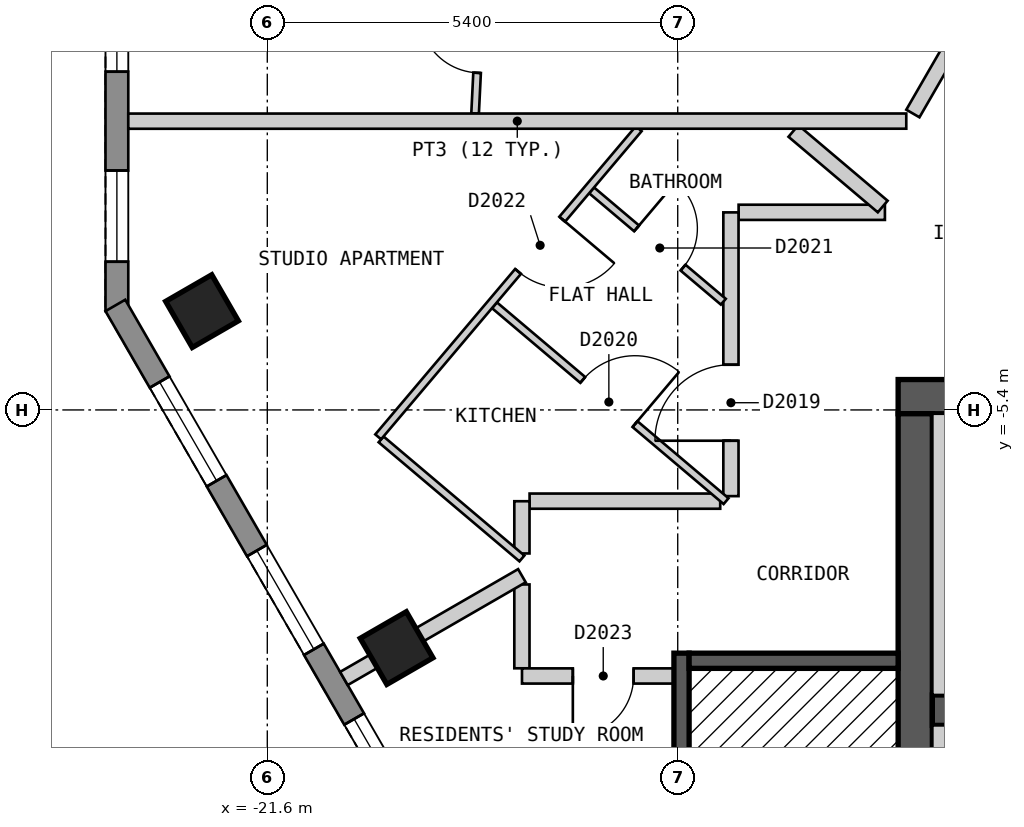
"""IFC4 building model, lengths in metres.
Left out: names, types, materials, properties, quantities, classifications, styles, units other than length and angle.
Written with IfcOpenShell. Run it as: python <this file> out.ifc"""

import sys

from ifc_helpers import new_model, si_unit, direction, frame, frame_2d, origin, origin_2d, place, context, subcontext, project, spatial, polyline, rectangle, outline, extrude, element, fill, save


model = new_model("IFC4")
c1 = context("Model", 3, precision=1e-05, world=origin(), true_north=direction((0.0, 1.0)))
c2 = subcontext(c1, "Body", "Model", "MODEL_VIEW")
j1 = project(units=[si_unit("LENGTHUNIT", "METRE"), si_unit("PLANEANGLEUNIT", "RADIAN")], contexts=[c1])
p1 = place(None, origin())
s1 = spatial("IfcSite", under=j1, at=p1, CompositionType="ELEMENT")
p2 = place(p1, origin())
s2 = spatial("IfcBuilding", under=s1, at=p2, CompositionType="ELEMENT")
p3 = place(p2, frame((0.0, 0.0, 238.8)))
s3 = spatial("IfcBuildingStorey", under=s2, at=p3, CompositionType="ELEMENT", Elevation=238.8)
for number, where, z_axis, x_axis in (
    (1, (-22.459, -4.1, 0.0), (0.0, 0.0, 1.0), (0.5, -0.866, 0.0)),
    (2, (-19.899, -8.533, 0.0), (0.0, 0.0, 1.0), (0.5, -0.866, 0.0)),
):
    element("IfcColumn", number, at=place(p3, frame(where, z_axis=z_axis, x_axis=x_axis)), inside=s3, PredefinedType="COLUMN", context=c2, shape_type="SweptSolid", body=[
        extrude(rectangle(XDim=0.7, YDim=0.7, at=origin_2d()), origin(), (0.0, 0.0, 1.0), 3.0),
    ])
p4 = place(p3, frame((-13.3, -5.225, 0.0), z_axis=(0.0, 0.0, 1.0), x_axis=(1.0, 0.0, 0.0)))
e3 = element("IfcWall", 3, at=p4, inside=s3, PredefinedType="SHEAR", context=c2, shape_type="SweptSolid", body=[
    extrude(rectangle(XDim=26.6, YDim=0.45, at=frame_2d((13.3, 0.0))), origin(), (0.0, 0.0, 1.0), 2.7),
])
p5 = place(p4, frame((23.65, 0.0, 0.0)))
e4 = element("IfcOpeningElement", 4, at=p5, cuts=e3, PredefinedType="OPENING", context=c2, shape_type="SweptSolid", body=[
    extrude(rectangle(XDim=1.2, YDim=2.1, at=frame_2d((0.6, 1.05))), frame((0.0, 0.235, 0.0), z_axis=(0.0, -1.0, 0.0), x_axis=(1.0, 0.0, 0.0)), (0.0, 0.0, 1.0), 0.47),
])
p6 = place(p3, frame((-13.075, -18.55, 0.0), z_axis=(0.0, 0.0, 1.0), x_axis=(0.0, 1.0, 0.0)))
e5 = element("IfcWall", 5, at=p6, inside=s3, PredefinedType="SHEAR", context=c2, shape_type="SweptSolid", body=[
    extrude(rectangle(XDim=13.1, YDim=0.45, at=frame_2d((6.55, 0.0))), origin(), (0.0, 0.0, 1.0), 2.7),
])
p7 = place(p6, frame((4.35, 0.0, 0.0)))
e6 = element("IfcOpeningElement", 6, at=p7, cuts=e5, PredefinedType="OPENING", context=c2, shape_type="SweptSolid", body=[
    extrude(rectangle(XDim=1.2, YDim=2.1, at=frame_2d((0.6, 1.05))), frame((0.0, 0.235, 0.0), z_axis=(0.0, -1.0, 0.0), x_axis=(1.0, 0.0, 0.0)), (0.0, 0.0, 1.0), 0.47),
])
p8 = place(p3, frame((-12.85, -9.35, 0.0), z_axis=(0.0, 0.0, 1.0), x_axis=(1.0, 0.0, 0.0)))
e7 = element("IfcWall", 7, at=p8, inside=s3, PredefinedType="SHEAR", context=c2, shape_type="SweptSolid", body=[
    extrude(rectangle(XDim=23.05, YDim=0.4, at=frame_2d((11.525, 0.0))), origin(), (0.0, 0.0, 1.0), 2.7),
])
p9 = place(p8, frame((1.45, 0.0, 0.0)))
e8 = element("IfcOpeningElement", 8, at=p9, cuts=e7, PredefinedType="OPENING", context=c2, shape_type="SweptSolid", body=[
    extrude(rectangle(XDim=1.1, YDim=2.1, at=frame_2d((0.55, 1.05))), frame((0.0, 0.21, 0.0), z_axis=(0.0, -1.0, 0.0), x_axis=(1.0, 0.0, 0.0)), (0.0, 0.0, 1.0), 0.42),
])
p10 = place(p8, frame((4.25, 0.0, 0.0)))
e9 = element("IfcOpeningElement", 9, at=p10, cuts=e7, PredefinedType="OPENING", context=c2, shape_type="SweptSolid", body=[
    extrude(rectangle(XDim=1.1, YDim=2.1, at=frame_2d((0.55, 1.05))), frame((0.0, 0.21, 0.0), z_axis=(0.0, -1.0, 0.0), x_axis=(1.0, 0.0, 0.0)), (0.0, 0.0, 1.0), 0.42),
])
p11 = place(p8, frame((7.05, 0.0, 0.0)))
e10 = element("IfcOpeningElement", 10, at=p11, cuts=e7, PredefinedType="OPENING", context=c2, shape_type="SweptSolid", body=[
    extrude(rectangle(XDim=1.1, YDim=2.1, at=frame_2d((0.55, 1.05))), frame((0.0, 0.21, 0.0), z_axis=(0.0, -1.0, 0.0), x_axis=(1.0, 0.0, 0.0)), (0.0, 0.0, 1.0), 0.42),
])
p12 = place(p8, frame((9.35, 0.0, 0.0)))
e11 = element("IfcOpeningElement", 11, at=p12, cuts=e7, PredefinedType="OPENING", context=c2, shape_type="SweptSolid", body=[
    extrude(rectangle(XDim=1.1, YDim=2.1, at=frame_2d((0.55, 1.05))), frame((0.0, 0.21, 0.0), z_axis=(0.0, -1.0, 0.0), x_axis=(1.0, 0.0, 0.0)), (0.0, 0.0, 1.0), 0.42),
])
p13 = place(p8, frame((11.65, 0.0, 0.0)))
e12 = element("IfcOpeningElement", 12, at=p13, cuts=e7, PredefinedType="OPENING", context=c2, shape_type="SweptSolid", body=[
    extrude(rectangle(XDim=1.1, YDim=2.1, at=frame_2d((0.55, 1.05))), frame((0.0, 0.21, 0.0), z_axis=(0.0, -1.0, 0.0), x_axis=(1.0, 0.0, 0.0)), (0.0, 0.0, 1.0), 0.42),
])
p14 = place(p8, frame((13.95, 0.0, 0.0)))
e13 = element("IfcOpeningElement", 13, at=p14, cuts=e7, PredefinedType="OPENING", context=c2, shape_type="SweptSolid", body=[
    extrude(rectangle(XDim=1.1, YDim=2.1, at=frame_2d((0.55, 1.05))), frame((0.0, 0.21, 0.0), z_axis=(0.0, -1.0, 0.0), x_axis=(1.0, 0.0, 0.0)), (0.0, 0.0, 1.0), 0.42),
])
p15 = place(p8, frame((16.25, 0.0, 0.0)))
e14 = element("IfcOpeningElement", 14, at=p15, cuts=e7, PredefinedType="OPENING", context=c2, shape_type="SweptSolid", body=[
    extrude(rectangle(XDim=1.1, YDim=2.1, at=frame_2d((0.55, 1.05))), frame((0.0, 0.21, 0.0), z_axis=(0.0, -1.0, 0.0), x_axis=(1.0, 0.0, 0.0)), (0.0, 0.0, 1.0), 0.42),
])
p16 = place(p8, frame((18.55, 0.0, 0.0)))
e15 = element("IfcOpeningElement", 15, at=p16, cuts=e7, PredefinedType="OPENING", context=c2, shape_type="SweptSolid", body=[
    extrude(rectangle(XDim=1.1, YDim=2.1, at=frame_2d((0.55, 1.05))), frame((0.0, 0.21, 0.0), z_axis=(0.0, -1.0, 0.0), x_axis=(1.0, 0.0, 0.0)), (0.0, 0.0, 1.0), 0.42),
])
p17 = place(p8, frame((20.95, 0.0, 0.0)))
e16 = element("IfcOpeningElement", 16, at=p17, cuts=e7, PredefinedType="OPENING", context=c2, shape_type="SweptSolid", body=[
    extrude(rectangle(XDim=1.1, YDim=2.1, at=frame_2d((0.55, 1.05))), frame((0.0, 0.21, 0.0), z_axis=(0.0, -1.0, 0.0), x_axis=(1.0, 0.0, 0.0)), (0.0, 0.0, 1.0), 0.42),
])
p18 = place(p3, frame((-23.579, 0.9, 0.0), z_axis=(0.0, 0.0, 1.0), x_axis=(0.0, -1.0, 0.0)))
e17 = element("IfcWall", 17, at=p18, inside=s3, PredefinedType="SOLIDWALL", context=c2, shape_type="SweptSolid", body=[
    extrude(outline(polyline([(0.0, -0.15), (5.0, -0.15), (4.92, 0.15), (0.08, 0.15), (0.0, -0.15)])), origin(), (0.0, 0.0, 1.0), 2.7),
])
p19 = place(p18, frame((0.65, 0.0, 0.15)))
e18 = element("IfcOpeningElement", 18, at=p19, cuts=e17, PredefinedType="OPENING", context=c2, shape_type="SweptSolid", body=[
    extrude(rectangle(XDim=1.2, YDim=2.1, at=frame_2d((0.6, 1.05))), frame((0.0, 0.16, 0.0), z_axis=(0.0, -1.0, 0.0), x_axis=(1.0, 0.0, 0.0)), (0.0, 0.0, 1.0), 0.32),
])
p20 = place(p18, frame((3.15, 0.0, 0.15)))
e19 = element("IfcOpeningElement", 19, at=p20, cuts=e17, PredefinedType="OPENING", context=c2, shape_type="SweptSolid", body=[
    extrude(rectangle(XDim=1.2, YDim=2.1, at=frame_2d((0.6, 1.05))), frame((0.0, 0.16, 0.0), z_axis=(0.0, -1.0, 0.0), x_axis=(1.0, 0.0, 0.0)), (0.0, 0.0, 1.0), 0.32),
])
p21 = place(p3, frame((-23.599, -4.025, 0.0), z_axis=(0.0, 0.0, 1.0), x_axis=(0.500012653391, -0.866018098222, 0.0)))
e20 = element("IfcWall", 20, at=p21, inside=s3, PredefinedType="SOLIDWALL", context=c2, shape_type="SweptSolid", body=[
    extrude(outline(polyline([(0.0, -0.15), (16.628, -0.15), (16.548, 0.15), (0.08, 0.15), (0.0, -0.15)])), origin(), (0.0, 0.0, 1.0), 2.7),
])
p22 = place(p21, frame((1.164, 0.0, 0.15)))
e21 = element("IfcOpeningElement", 21, at=p22, cuts=e20, PredefinedType="OPENING", context=c2, shape_type="SweptSolid", body=[
    extrude(rectangle(XDim=1.5, YDim=2.1, at=frame_2d((0.75, 1.05))), frame((0.0, 0.16, 0.0), z_axis=(0.0, -1.0, 0.0), x_axis=(1.0, 0.0, 0.0)), (0.0, 0.0, 1.0), 0.32),
])
p23 = place(p21, frame((3.724, 0.0, 0.15)))
e22 = element("IfcOpeningElement", 22, at=p23, cuts=e20, PredefinedType="OPENING", context=c2, shape_type="SweptSolid", body=[
    extrude(rectangle(XDim=1.5, YDim=2.1, at=frame_2d((0.75, 1.05))), frame((0.0, 0.16, 0.0), z_axis=(0.0, -1.0, 0.0), x_axis=(1.0, 0.0, 0.0)), (0.0, 0.0, 1.0), 0.32),
])
p24 = place(p21, frame((6.283, 0.0, 0.15)))
e23 = element("IfcOpeningElement", 23, at=p24, cuts=e20, PredefinedType="OPENING", context=c2, shape_type="SweptSolid", body=[
    extrude(rectangle(XDim=1.5, YDim=2.1, at=frame_2d((0.75, 1.05))), frame((0.0, 0.16, 0.0), z_axis=(0.0, -1.0, 0.0), x_axis=(1.0, 0.0, 0.0)), (0.0, 0.0, 1.0), 0.32),
])
p25 = place(p21, frame((8.843, 0.0, 0.15)))
e24 = element("IfcOpeningElement", 24, at=p25, cuts=e20, PredefinedType="OPENING", context=c2, shape_type="SweptSolid", body=[
    extrude(rectangle(XDim=1.5, YDim=2.1, at=frame_2d((0.75, 1.05))), frame((0.0, 0.16, 0.0), z_axis=(0.0, -1.0, 0.0), x_axis=(1.0, 0.0, 0.0)), (0.0, 0.0, 1.0), 0.32),
])
p26 = place(p21, frame((11.403, 0.0, 0.15)))
e25 = element("IfcOpeningElement", 25, at=p26, cuts=e20, PredefinedType="OPENING", context=c2, shape_type="SweptSolid", body=[
    extrude(rectangle(XDim=1.5, YDim=2.1, at=frame_2d((0.75, 1.05))), frame((0.0, 0.16, 0.0), z_axis=(0.0, -1.0, 0.0), x_axis=(1.0, 0.0, 0.0)), (0.0, 0.0, 1.0), 0.32),
])
p27 = place(p21, frame((13.962, 0.0, 0.15)))
e26 = element("IfcOpeningElement", 26, at=p27, cuts=e20, PredefinedType="OPENING", context=c2, shape_type="SweptSolid", body=[
    extrude(rectangle(XDim=1.5, YDim=2.1, at=frame_2d((0.75, 1.05))), frame((0.0, 0.16, 0.0), z_axis=(0.0, -1.0, 0.0), x_axis=(1.0, 0.0, 0.0)), (0.0, 0.0, 1.0), 0.32),
])
p28 = place(p3, frame((-18.25, -7.696, 0.0), z_axis=(0.0, 0.0, 1.0), x_axis=(0.0, -1.0, 0.0)))
e27 = element("IfcWall", 27, at=p28, inside=s3, PredefinedType="PARTITIONING", context=c2, shape_type="SweptSolid", body=[
    extrude(rectangle(XDim=1.103, YDim=0.2, at=frame_2d((0.552, 0.0))), origin(), (0.0, 0.0, 1.0), 2.7),
])
p29 = place(p3, frame((-18.149, -6.6, 0.0), z_axis=(0.0, 0.0, 1.0), x_axis=(1.0, 0.0, 0.0)))
e28 = element("IfcWall", 28, at=p29, inside=s3, PredefinedType="PARTITIONING", context=c2, shape_type="SweptSolid", body=[
    extrude(rectangle(XDim=2.508, YDim=0.2, at=frame_2d((1.254, 0.0))), origin(), (0.0, 0.0, 1.0), 2.7),
])
p30 = place(p3, frame((-18.249, -8.9, 0.0), z_axis=(0.0, 0.0, 1.0), x_axis=(1.0, 0.0, 0.0)))
e29 = element("IfcWall", 29, at=p30, inside=s3, PredefinedType="PARTITIONING", context=c2, shape_type="SweptSolid", body=[
    extrude(rectangle(XDim=2.199, YDim=0.2, at=frame_2d((1.1, 0.0))), origin(), (0.0, 0.0, 1.0), 2.7),
])
p31 = place(p30, frame((0.669, 0.0, 0.0)))
e30 = element("IfcOpeningElement", 30, at=p31, cuts=e29, PredefinedType="OPENING", context=c2, shape_type="SweptSolid", body=[
    extrude(rectangle(XDim=0.8, YDim=2.1, at=frame_2d((0.4, 1.05))), frame((0.0, 0.11, 0.0), z_axis=(0.0, -1.0, 0.0), x_axis=(1.0, 0.0, 0.0)), (0.0, 0.0, 1.0), 0.22),
])
p32 = place(p3, frame((-15.399, -2.8, 0.0), z_axis=(0.0, 0.0, 1.0), x_axis=(1.0, 0.0, 0.0)))
e31 = element("IfcWall", 31, at=p32, inside=s3, PredefinedType="PARTITIONING", context=c2, shape_type="SweptSolid", body=[
    extrude(rectangle(XDim=1.925, YDim=0.2, at=frame_2d((0.962, 0.0))), origin(), (0.0, 0.0, 1.0), 2.7),
])
p33 = place(p3, frame((-13.106, -1.5, 0.0), z_axis=(0.0, 0.0, 1.0), x_axis=(0.500025705601, 0.86601056214, 0.0)))
e32 = element("IfcWall", 32, at=p33, inside=s3, PredefinedType="PARTITIONING", context=c2, shape_type="SweptSolid", body=[
    extrude(rectangle(XDim=7.735, YDim=0.2, at=frame_2d((3.868, 0.0))), origin(), (0.0, 0.0, 1.0), 2.7),
])
p34 = place(p3, frame((-15.5, -6.534, 0.0), z_axis=(0.0, 0.0, 1.0), x_axis=(0.0, 1.0, 0.0)))
e33 = element("IfcWall", 33, at=p34, inside=s3, PredefinedType="PARTITIONING", context=c2, shape_type="SweptSolid", body=[
    extrude(rectangle(XDim=3.733, YDim=0.2, at=frame_2d((1.866, 0.0))), origin(), (0.0, 0.0, 1.0), 2.7),
])
p35 = place(p34, frame((0.729, 0.0, 0.0)))
e34 = element("IfcOpeningElement", 34, at=p35, cuts=e33, PredefinedType="OPENING", context=c2, shape_type="SweptSolid", body=[
    extrude(rectangle(XDim=1.0, YDim=2.1, at=frame_2d((0.5, 1.05))), frame((0.0, 0.11, 0.0), z_axis=(0.0, -1.0, 0.0), x_axis=(1.0, 0.0, 0.0)), (0.0, 0.0, 1.0), 0.22),
])
p36 = place(p3, frame((-18.25, -7.288, 0.0), z_axis=(0.0, 0.0, 1.0), x_axis=(0.0, 1.0, 0.0)))
e35 = element("IfcWall", 35, at=p36, inside=s3, PredefinedType="PARTITIONING", context=c2, shape_type="SweptSolid", body=[
    extrude(rectangle(XDim=0.687, YDim=0.2, at=frame_2d((0.344, 0.0))), origin(), (0.0, 0.0, 1.0), 2.7),
])
p37 = place(p3, frame((-17.333, -2.511, 0.0), z_axis=(0.0, 0.0, 1.0), x_axis=(0.763651478242, -0.645628701174, 0.0)))
e36 = element("IfcWall", 36, at=p37, inside=s3, PredefinedType="PARTITIONING", context=c2, shape_type="SweptSolid", body=[
    extrude(rectangle(XDim=2.269, YDim=0.1, at=frame_2d((1.135, 0.0))), origin(), (0.0, 0.0, 1.0), 2.7),
])
p38 = place(p37, frame((0.775, 0.0, 0.0)))
e37 = element("IfcOpeningElement", 37, at=p38, cuts=e36, PredefinedType="OPENING", context=c2, shape_type="SweptSolid", body=[
    extrude(rectangle(XDim=0.8, YDim=2.1, at=frame_2d((0.4, 1.05))), frame((0.0, 0.06, 0.0), z_axis=(0.0, -1.0, 0.0), x_axis=(1.0, 0.0, 0.0)), (0.0, 0.0, 1.0), 0.12),
])
p39 = place(p3, frame((-18.611, -4.023, 0.0), z_axis=(0.0, 0.0, 1.0), x_axis=(0.763532454368, -0.645769456639, 0.0)))
e38 = element("IfcWall", 38, at=p39, inside=s3, PredefinedType="PARTITIONING", context=c2, shape_type="SweptSolid", body=[
    extrude(rectangle(XDim=3.991, YDim=0.1, at=frame_2d((1.995, 0.0))), origin(), (0.0, 0.0, 1.0), 2.7),
])
p40 = place(p39, frame((1.521, 0.0, 0.0)))
e39 = element("IfcOpeningElement", 39, at=p40, cuts=e38, PredefinedType="OPENING", context=c2, shape_type="SweptSolid", body=[
    extrude(rectangle(XDim=0.9, YDim=2.1, at=frame_2d((0.45, 1.05))), frame((0.0, 0.06, 0.0), z_axis=(0.0, -1.0, 0.0), x_axis=(1.0, 0.0, 0.0)), (0.0, 0.0, 1.0), 0.12),
])
p41 = place(p3, frame((-20.103, -5.787, 0.0), z_axis=(0.0, 0.0, 1.0), x_axis=(0.763599944726, -0.645689650231, 0.0)))
e40 = element("IfcWall", 40, at=p41, inside=s3, PredefinedType="PARTITIONING", context=c2, shape_type="SweptSolid", body=[
    extrude(rectangle(XDim=2.427, YDim=0.1, at=frame_2d((1.213, 0.0))), origin(), (0.0, 0.0, 1.0), 2.7),
])
p42 = place(p3, frame((-20.141, -5.754, 0.0), z_axis=(0.0, 0.0, 1.0), x_axis=(0.645717522601, 0.763576375359, 0.0)))
e41 = element("IfcWall", 41, at=p42, inside=s3, PredefinedType="PARTITIONING", context=c2, shape_type="SweptSolid", body=[
    extrude(rectangle(XDim=5.309, YDim=0.1, at=frame_2d((2.655, 0.0))), origin(), (0.0, 0.0, 1.0), 2.7),
])
p43 = place(p42, frame((2.85, 0.0, 0.0)))
e42 = element("IfcOpeningElement", 42, at=p43, cuts=e41, PredefinedType="OPENING", context=c2, shape_type="SweptSolid", body=[
    extrude(rectangle(XDim=0.9, YDim=2.1, at=frame_2d((0.45, 1.05))), frame((0.0, 0.06, 0.0), z_axis=(0.0, -1.0, 0.0), x_axis=(1.0, 0.0, 0.0)), (0.0, 0.0, 1.0), 0.12),
])
p44 = place(p3, frame((-18.866, -1.5, 0.0), z_axis=(0.0, 0.0, 1.0), x_axis=(0.048923533446, 0.998802526967, 0.0)))
e43 = element("IfcWall", 43, at=p44, inside=s3, PredefinedType="PARTITIONING", context=c2, shape_type="SweptSolid", body=[
    extrude(rectangle(XDim=1.921, YDim=0.1, at=frame_2d((0.96, 0.0))), origin(), (0.0, 0.0, 1.0), 2.7),
])
p45 = place(p44, frame((0.536, 0.0, 0.0)))
e44 = element("IfcOpeningElement", 44, at=p45, cuts=e43, PredefinedType="OPENING", context=c2, shape_type="SweptSolid", body=[
    extrude(rectangle(XDim=0.8, YDim=2.1, at=frame_2d((0.4, 1.05))), frame((0.0, 0.06, 0.0), z_axis=(0.0, -1.0, 0.0), x_axis=(1.0, 0.0, 0.0)), (0.0, 0.0, 1.0), 0.12),
])
p46 = place(p3, frame((-14.678, -1.73, 0.0), z_axis=(0.0, 0.0, 1.0), x_axis=(0.763428399558, -0.645892466861, 0.0)))
e45 = element("IfcWall", 45, at=p46, inside=s3, PredefinedType="PARTITIONING", context=c2, shape_type="SweptSolid", body=[
    extrude(rectangle(XDim=1.539, YDim=0.2, at=frame_2d((0.77, 0.0))), origin(), (0.0, 0.0, 1.0), 2.7),
])
p47 = place(p3, frame((-23.429, -1.601, 0.0), z_axis=(0.0, 0.0, 1.0), x_axis=(0.999999995449, 9.5406191e-05, 0.0)))
e46 = element("IfcWall", 46, at=p47, inside=s3, PredefinedType="PARTITIONING", context=c2, shape_type="SweptSolid", body=[
    extrude(rectangle(XDim=10.236, YDim=0.2, at=frame_2d((5.118, 0.0))), origin(), (0.0, 0.0, 1.0), 2.7),
])
p48 = place(p3, frame((-20.592, -8.933, 0.0), z_axis=(0.0, 0.0, 1.0), x_axis=(0.866045775131, 0.499964714133, 0.0)))
e47 = element("IfcWall", 47, at=p48, inside=s3, PredefinedType="PARTITIONING", context=c2, shape_type="SweptSolid", body=[
    extrude(rectangle(XDim=2.704, YDim=0.2, at=frame_2d((1.352, 0.0))), origin(), (0.0, 0.0, 1.0), 2.7),
])
p49 = place(p3, frame((-16.15, -14.4, 0.0), z_axis=(0.0, 0.0, 1.0), x_axis=(0.0, 1.0, 0.0)))
e48 = element("IfcWall", 48, at=p49, inside=s3, PredefinedType="SOLIDWALL", context=c2, shape_type="SweptSolid", body=[
    extrude(rectangle(XDim=5.8, YDim=0.2, at=frame_2d((2.9, 0.0))), origin(), (0.0, 0.0, 1.0), 2.7),
])
p50 = place(p3, frame((-16.05, -8.7, 0.0), z_axis=(0.0, 0.0, 1.0), x_axis=(1.0, 0.0, 0.0)))
e49 = element("IfcWall", 49, at=p50, inside=s3, PredefinedType="SOLIDWALL", context=c2, shape_type="SweptSolid", body=[
    extrude(rectangle(XDim=2.75, YDim=0.2, at=frame_2d((1.375, 0.0))), origin(), (0.0, 0.0, 1.0), 2.7),
])
p51 = place(p3, frame((-12.475, -13.0, 0.0), z_axis=(0.0, 0.0, 1.0), x_axis=(0.0, 1.0, 0.0)))
e50 = element("IfcWall", 50, at=p51, inside=s3, PredefinedType="PARTITIONING", context=c2, shape_type="SweptSolid", body=[
    extrude(rectangle(XDim=3.45, YDim=0.75, at=frame_2d((1.725, 0.0))), origin(), (0.0, 0.0, 1.0), 2.7),
])
p52 = place(p3, frame((-12.475, -9.15, 0.0), z_axis=(0.0, 0.0, 1.0), x_axis=(0.0, 1.0, 0.0)))
e51 = element("IfcWall", 51, at=p52, inside=s3, PredefinedType="SOLIDWALL", context=c2, shape_type="SweptSolid", body=[
    extrude(rectangle(XDim=3.7, YDim=0.75, at=frame_2d((1.85, 0.0))), origin(), (0.0, 0.0, 1.0), 2.7),
])
p53 = place(p19, origin())
e52 = element("IfcWindow", 52, at=p53, inside=s3, PartitioningType="SINGLE_PANEL", PredefinedType="WINDOW", context=c2, shape_type="SweptSolid", body=[
    extrude(rectangle(XDim=1.2, YDim=2.1, at=frame_2d((0.6, 1.05))), frame((0.0, 0.03, 0.0), z_axis=(0.0, -1.0, 0.0), x_axis=(1.0, 0.0, 0.0)), (0.0, 0.0, 1.0), 0.06),
])
fill(e18, e52)
p54 = place(p20, origin())
e53 = element("IfcWindow", 53, at=p54, inside=s3, PartitioningType="SINGLE_PANEL", PredefinedType="WINDOW", context=c2, shape_type="SweptSolid", body=[
    extrude(rectangle(XDim=1.2, YDim=2.1, at=frame_2d((0.6, 1.05))), frame((0.0, 0.03, 0.0), z_axis=(0.0, -1.0, 0.0), x_axis=(1.0, 0.0, 0.0)), (0.0, 0.0, 1.0), 0.06),
])
fill(e19, e53)
p55 = place(p22, origin())
e54 = element("IfcWindow", 54, at=p55, inside=s3, PartitioningType="SINGLE_PANEL", PredefinedType="WINDOW", context=c2, shape_type="SweptSolid", body=[
    extrude(rectangle(XDim=1.5, YDim=2.1, at=frame_2d((0.75, 1.05))), frame((0.0, 0.03, 0.0), z_axis=(0.0, -1.0, 0.0), x_axis=(1.0, 0.0, 0.0)), (0.0, 0.0, 1.0), 0.06),
])
fill(e21, e54)
p56 = place(p23, origin())
e55 = element("IfcWindow", 55, at=p56, inside=s3, PartitioningType="SINGLE_PANEL", PredefinedType="WINDOW", context=c2, shape_type="SweptSolid", body=[
    extrude(rectangle(XDim=1.5, YDim=2.1, at=frame_2d((0.75, 1.05))), frame((0.0, 0.03, 0.0), z_axis=(0.0, -1.0, 0.0), x_axis=(1.0, 0.0, 0.0)), (0.0, 0.0, 1.0), 0.06),
])
fill(e22, e55)
p57 = place(p24, origin())
e56 = element("IfcWindow", 56, at=p57, inside=s3, PartitioningType="SINGLE_PANEL", PredefinedType="WINDOW", context=c2, shape_type="SweptSolid", body=[
    extrude(rectangle(XDim=1.5, YDim=2.1, at=frame_2d((0.75, 1.05))), frame((0.0, 0.03, 0.0), z_axis=(0.0, -1.0, 0.0), x_axis=(1.0, 0.0, 0.0)), (0.0, 0.0, 1.0), 0.06),
])
fill(e23, e56)
p58 = place(p45, origin())
e57 = element("IfcDoor", 57, at=p58, inside=s3, OperationType="SINGLE_SWING_RIGHT", PredefinedType="DOOR", context=c2, shape_type="SweptSolid", body=[
    extrude(rectangle(XDim=0.8, YDim=2.1, at=frame_2d((0.4, 1.05))), frame((0.0, 0.025, 0.0), z_axis=(0.0, -1.0, 0.0), x_axis=(1.0, 0.0, 0.0)), (0.0, 0.0, 1.0), 0.05),
])
fill(e44, e57)
p59 = place(p35, origin())
e58 = element("IfcDoor", 58, at=p59, inside=s3, OperationType="SINGLE_SWING_LEFT", PredefinedType="DOOR", context=c2, shape_type="SweptSolid", body=[
    extrude(rectangle(XDim=1.0, YDim=2.1, at=frame_2d((0.5, 1.05))), frame((0.0, 0.025, 0.0), z_axis=(0.0, -1.0, 0.0), x_axis=(1.0, 0.0, 0.0)), (0.0, 0.0, 1.0), 0.05),
])
fill(e34, e58)
p60 = place(p40, origin())
e59 = element("IfcDoor", 59, at=p60, inside=s3, OperationType="SINGLE_SWING_RIGHT", PredefinedType="DOOR", context=c2, shape_type="SweptSolid", body=[
    extrude(rectangle(XDim=0.9, YDim=2.1, at=frame_2d((0.45, 1.05))), frame((0.0, 0.025, 0.0), z_axis=(0.0, -1.0, 0.0), x_axis=(1.0, 0.0, 0.0)), (0.0, 0.0, 1.0), 0.05),
])
fill(e39, e59)
p61 = place(p38, origin())
e60 = element("IfcDoor", 60, at=p61, inside=s3, OperationType="SINGLE_SWING_LEFT", PredefinedType="DOOR", context=c2, shape_type="SweptSolid", body=[
    extrude(rectangle(XDim=0.8, YDim=2.1, at=frame_2d((0.4, 1.05))), frame((0.0, 0.025, 0.0), z_axis=(0.0, -1.0, 0.0), x_axis=(1.0, 0.0, 0.0)), (0.0, 0.0, 1.0), 0.05),
])
fill(e37, e60)
p62 = place(p43, origin())
e61 = element("IfcDoor", 61, at=p62, inside=s3, OperationType="SINGLE_SWING_RIGHT", PredefinedType="DOOR", context=c2, shape_type="SweptSolid", body=[
    extrude(rectangle(XDim=0.9, YDim=2.1, at=frame_2d((0.45, 1.05))), frame((0.0, 0.025, 0.0), z_axis=(0.0, -1.0, 0.0), x_axis=(1.0, 0.0, 0.0)), (0.0, 0.0, 1.0), 0.05),
])
fill(e42, e61)
p63 = place(p31, origin())
e62 = element("IfcDoor", 62, at=p63, inside=s3, OperationType="SINGLE_SWING_LEFT", PredefinedType="DOOR", context=c2, shape_type="SweptSolid", body=[
    extrude(rectangle(XDim=0.8, YDim=2.1, at=frame_2d((0.4, 1.05))), frame((0.0, 0.025, 0.0), z_axis=(0.0, -1.0, 0.0), x_axis=(1.0, 0.0, 0.0)), (0.0, 0.0, 1.0), 0.05),
])
fill(e30, e62)
save(model, sys.argv[1])
